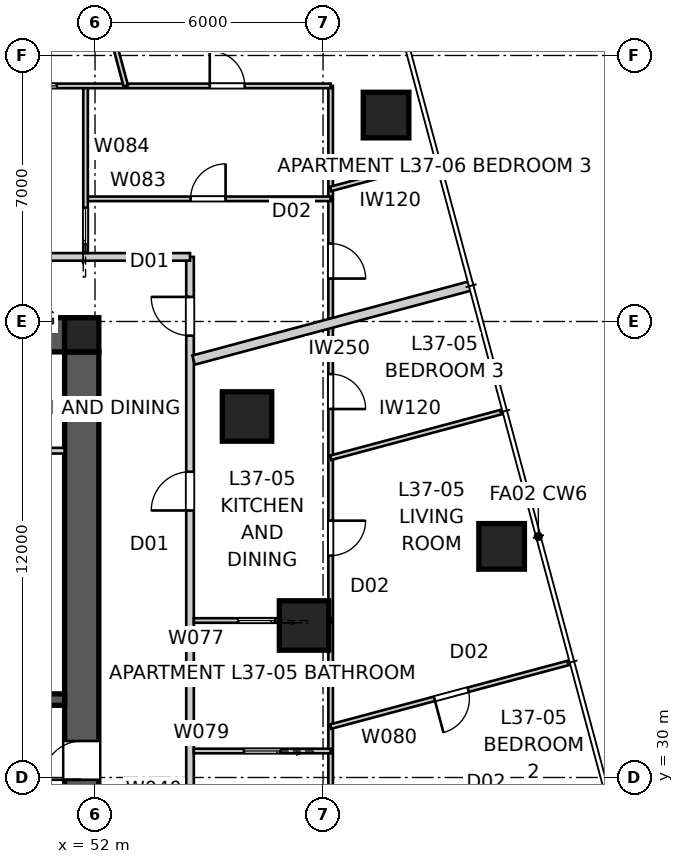
"""IFC4 building model, lengths in metres.
Left out: names, types, materials, properties, quantities, classifications, styles, units other than length and angle.
Written with IfcOpenShell. Run it as: python <this file> out.ifc"""

import sys

from ifc_helpers import new_model, si_unit, direction, frame, frame_2d, origin, origin_2d, place, context, subcontext, project, spatial, polyline, rectangle, outline, extrude, element, fill, save


model = new_model("IFC4")
c1 = context("Model", 3, precision=1e-05, world=origin(), true_north=direction((0.0, 1.0)))
c2 = subcontext(c1, "Body", "Model", "MODEL_VIEW")
j1 = project(units=[si_unit("LENGTHUNIT", "METRE"), si_unit("PLANEANGLEUNIT", "RADIAN")], contexts=[c1])
p1 = place(None, origin())
s1 = spatial("IfcSite", under=j1, at=p1, CompositionType="ELEMENT")
p2 = place(p1, origin())
s2 = spatial("IfcBuilding", under=s1, at=p2, CompositionType="ELEMENT")
p3 = place(p2, frame((0.0, 0.0, 135.4)))
s3 = spatial("IfcBuildingStorey", under=s2, at=p3, CompositionType="ELEMENT", Elevation=135.4)
p4 = place(p3, frame((28.8, 41.65, 0.0), z_axis=(0.0, 0.0, 1.0), x_axis=(1.0, 0.0, 0.0)))
e1 = element("IfcWall", 1, at=p4, inside=s3, PredefinedType="SHEAR", context=c2, shape_type="SweptSolid", body=[
    extrude(outline(polyline([(0.0, -0.45), (22.4, -0.45), (22.4, -0.025), (22.85, -0.025), (22.85, 0.025), (22.4, 0.025), (22.4, 0.45), (0.0, 0.45), (0.0, 0.025), (-0.45, 0.025), (-0.45, -0.025), (0.0, -0.025), (0.0, -0.45)])), origin(), (0.0, 0.0, 1.0), 3.4),
])
p5 = place(p3, frame((51.65, 18.8, 0.0), z_axis=(0.0, 0.0, 1.0), x_axis=(0.0, 1.0, 0.0)))
e2 = element("IfcWall", 2, at=p5, inside=s3, PredefinedType="SHEAR", context=c2, shape_type="SweptSolid", body=[
    extrude(outline(polyline([(0.0, -0.45), (22.4, -0.45), (22.4, -0.025), (22.85, -0.025), (22.85, 0.025), (22.4, 0.025), (22.4, 0.45), (0.0, 0.45), (0.0, 0.025), (-0.45, 0.025), (-0.45, -0.025), (0.0, -0.025), (0.0, -0.45)])), origin(), (0.0, 0.0, 1.0), 3.4),
])
p6 = place(p5, frame((11.14, 0.0, 0.0)))
e3 = element("IfcOpeningElement", 3, at=p6, cuts=e2, PredefinedType="OPENING", context=c2, shape_type="SweptSolid", body=[
    extrude(rectangle(XDim=1.02, YDim=2.4, at=frame_2d((0.51, 1.2))), frame((0.0, 0.46, 0.0), z_axis=(0.0, -1.0, 0.0), x_axis=(1.0, 0.0, 0.0)), (0.0, 0.0, 1.0), 0.92),
])
p7 = place(p3, frame((28.8, 32.05, 0.0), z_axis=(0.0, 0.0, 1.0), x_axis=(1.0, 0.0, 0.0)))
e4 = element("IfcWall", 4, at=p7, inside=s3, PredefinedType="SHEAR", context=c2, shape_type="SweptSolid", body=[
    extrude(rectangle(XDim=22.4, YDim=0.3, at=frame_2d((11.2, 0.0))), origin(), (0.0, 0.0, 1.0), 3.4),
])
p8 = place(p7, frame((19.04, 0.0, 0.0)))
e5 = element("IfcOpeningElement", 5, at=p8, cuts=e4, PredefinedType="OPENING", context=c2, shape_type="SweptSolid", body=[
    extrude(rectangle(XDim=0.92, YDim=2.1, at=frame_2d((0.46, 1.05))), frame((0.0, 0.16, 0.0), z_axis=(0.0, -1.0, 0.0), x_axis=(1.0, 0.0, 0.0)), (0.0, 0.0, 1.0), 0.32),
])
p9 = place(p7, frame((1.265, 0.0, 0.0)))
e6 = element("IfcOpeningElement", 6, at=p9, cuts=e4, PredefinedType="OPENING", context=c2, shape_type="SweptSolid", body=[
    extrude(rectangle(XDim=1.02, YDim=2.1, at=frame_2d((0.51, 1.05))), frame((0.0, 0.16, 0.0), z_axis=(0.0, -1.0, 0.0), x_axis=(1.0, 0.0, 0.0)), (0.0, 0.0, 1.0), 0.32),
])
p10 = place(p7, frame((4.015, 0.0, 0.0)))
e7 = element("IfcOpeningElement", 7, at=p10, cuts=e4, PredefinedType="OPENING", context=c2, shape_type="SweptSolid", body=[
    extrude(rectangle(XDim=0.92, YDim=2.1, at=frame_2d((0.46, 1.05))), frame((0.0, 0.16, 0.0), z_axis=(0.0, -1.0, 0.0), x_axis=(1.0, 0.0, 0.0)), (0.0, 0.0, 1.0), 0.32),
])
p11 = place(p7, frame((6.45, 0.0, 0.0)))
e8 = element("IfcOpeningElement", 8, at=p11, cuts=e4, PredefinedType="OPENING", context=c2, shape_type="SweptSolid", body=[
    extrude(rectangle(XDim=1.1, YDim=2.1, at=frame_2d((0.55, 1.05))), frame((0.0, 0.16, 0.0), z_axis=(0.0, -1.0, 0.0), x_axis=(1.0, 0.0, 0.0)), (0.0, 0.0, 1.0), 0.32),
])
p12 = place(p7, frame((9.25, 0.0, 0.0)))
e9 = element("IfcOpeningElement", 9, at=p12, cuts=e4, PredefinedType="OPENING", context=c2, shape_type="SweptSolid", body=[
    extrude(rectangle(XDim=1.1, YDim=2.1, at=frame_2d((0.55, 1.05))), frame((0.0, 0.16, 0.0), z_axis=(0.0, -1.0, 0.0), x_axis=(1.0, 0.0, 0.0)), (0.0, 0.0, 1.0), 0.32),
])
p13 = place(p7, frame((14.85, 0.0, 0.0)))
e10 = element("IfcOpeningElement", 10, at=p13, cuts=e4, PredefinedType="OPENING", context=c2, shape_type="SweptSolid", body=[
    extrude(rectangle(XDim=1.1, YDim=2.1, at=frame_2d((0.55, 1.05))), frame((0.0, 0.16, 0.0), z_axis=(0.0, -1.0, 0.0), x_axis=(1.0, 0.0, 0.0)), (0.0, 0.0, 1.0), 0.32),
])
p14 = place(p3, frame((51.65, 41.65, 0.0), z_axis=(0.0, 0.0, 1.0), x_axis=(1.0, 0.0, 0.0)))
e11 = element("IfcColumn", 11, at=p14, inside=s3, PredefinedType="COLUMN", context=c2, shape_type="SweptSolid", body=[
    extrude(rectangle(XDim=0.9, YDim=0.9, at=origin_2d()), origin(), (0.0, 0.0, 1.0), 3.4),
])
for number, where, z_axis, x_axis in (
    (12, (62.699, 36.082, 0.0), (0.0, 0.0, 1.0), (1.0, 0.0, 0.0)),
    (13, (59.658, 47.432, 0.0), (0.0, 0.0, 1.0), (1.0, 0.0, 0.0)),
):
    element("IfcColumn", number, at=place(p3, frame(where, z_axis=z_axis, x_axis=x_axis)), inside=s3, PredefinedType="COLUMN", context=c2, shape_type="SweptSolid", body=[
        extrude(rectangle(XDim=1.2, YDim=1.2, at=origin_2d()), origin(), (0.0, 0.0, 1.0), 3.2),
    ])
for number, where, z_axis, x_axis in (
    (14, (57.5, 34.0, 0.0), (0.0, 0.0, 1.0), (1.0, 0.0, 0.0)),
    (15, (56.0, 39.5, 0.0), (0.0, 0.0, 1.0), (1.0, 0.0, 0.0)),
):
    element("IfcColumn", number, at=place(p3, frame(where, z_axis=z_axis, x_axis=x_axis)), inside=s3, PredefinedType="COLUMN", context=c2, shape_type="SweptSolid", body=[
        extrude(rectangle(XDim=1.3, YDim=1.3, at=origin_2d()), origin(), (0.0, 0.0, 1.0), 3.4),
    ])
p15 = place(p3, frame((54.5, 15.5, 0.0), z_axis=(0.0, 0.0, 1.0), x_axis=(0.0, 1.0, 0.0)))
e16 = element("IfcWall", 16, at=p15, inside=s3, PredefinedType="PARTITIONING", context=c2, shape_type="SweptSolid", body=[
    extrude(rectangle(XDim=28.2, YDim=0.2, at=frame_2d((14.1, 0.0))), origin(), (0.0, 0.0, 1.0), 3.2),
])
p16 = place(p15, frame((21.527, 0.0, 0.0)))
e17 = element("IfcOpeningElement", 17, at=p16, cuts=e16, PredefinedType="OPENING", context=c2, shape_type="SweptSolid", body=[
    extrude(rectangle(XDim=1.02, YDim=2.34, at=frame_2d((0.51, 1.17))), frame((0.0, 0.11, 0.0), z_axis=(0.0, -1.0, 0.0), x_axis=(1.0, 0.0, 0.0)), (0.0, 0.0, 1.0), 0.22),
])
p17 = place(p15, frame((5.806, 0.0, 0.0)))
e18 = element("IfcOpeningElement", 18, at=p17, cuts=e16, PredefinedType="OPENING", context=c2, shape_type="SweptSolid", body=[
    extrude(rectangle(XDim=1.02, YDim=2.34, at=frame_2d((0.51, 1.17))), frame((0.0, 0.11, 0.0), z_axis=(0.0, -1.0, 0.0), x_axis=(1.0, 0.0, 0.0)), (0.0, 0.0, 1.0), 0.22),
])
p18 = place(p15, frame((26.127, 0.0, 0.0)))
e19 = element("IfcOpeningElement", 19, at=p18, cuts=e16, PredefinedType="OPENING", context=c2, shape_type="SweptSolid", body=[
    extrude(rectangle(XDim=1.02, YDim=2.34, at=frame_2d((0.51, 1.17))), frame((0.0, 0.11, 0.0), z_axis=(0.0, -1.0, 0.0), x_axis=(1.0, 0.0, 0.0)), (0.0, 0.0, 1.0), 0.22),
])
p19 = place(p3, frame((54.5, 43.7, 0.0), z_axis=(0.0, 0.0, 1.0), x_axis=(-1.0, 0.0, 0.0)))
e20 = element("IfcWall", 20, at=p19, inside=s3, PredefinedType="PARTITIONING", context=c2, shape_type="SweptSolid", body=[
    extrude(rectangle(XDim=29.0, YDim=0.2, at=frame_2d((14.5, 0.0))), origin(), (0.0, 0.0, 1.0), 3.2),
])
p20 = place(p19, frame((12.852, 0.0, 0.0)))
e21 = element("IfcOpeningElement", 21, at=p20, cuts=e20, PredefinedType="OPENING", context=c2, shape_type="SweptSolid", body=[
    extrude(rectangle(XDim=1.02, YDim=2.34, at=frame_2d((0.51, 1.17))), frame((0.0, 0.11, 0.0), z_axis=(0.0, -1.0, 0.0), x_axis=(1.0, 0.0, 0.0)), (0.0, 0.0, 1.0), 0.22),
])
p21 = place(p19, frame((5.529, 0.0, 0.0)))
e22 = element("IfcOpeningElement", 22, at=p21, cuts=e20, PredefinedType="OPENING", context=c2, shape_type="SweptSolid", body=[
    extrude(rectangle(XDim=1.02, YDim=2.34, at=frame_2d((0.51, 1.17))), frame((0.0, 0.11, 0.0), z_axis=(0.0, -1.0, 0.0), x_axis=(1.0, 0.0, 0.0)), (0.0, 0.0, 1.0), 0.22),
])
p22 = place(p3, frame((61.896, 42.942, 0.0), z_axis=(0.0, 0.0, 1.0), x_axis=(-0.965924988656, -0.258822171171, 0.0)))
e23 = element("IfcWall", 23, at=p22, inside=s3, PredefinedType="PARTITIONING", context=c2, shape_type="SweptSolid", body=[
    extrude(rectangle(XDim=7.56, YDim=0.25, at=frame_2d((3.78, 0.0))), origin(), (0.0, 0.0, 1.0), 3.2),
])
p23 = place(p3, frame((43.0, 38.6, 0.0), z_axis=(0.0, 0.0, 1.0), x_axis=(1.0, 0.0, 0.0)))
e24 = element("IfcWall", 24, at=p23, inside=s3, PredefinedType="SOLIDWALL", context=c2, shape_type="SweptSolid", body=[
    extrude(rectangle(XDim=8.2, YDim=0.15, at=frame_2d((4.1, 0.0))), origin(), (0.0, 0.0, 1.0), 3.2),
])
p24 = place(p23, frame((3.64, 0.0, 0.0)))
e25 = element("IfcOpeningElement", 25, at=p24, cuts=e24, PredefinedType="OPENING", context=c2, shape_type="SweptSolid", body=[
    extrude(rectangle(XDim=0.92, YDim=2.1, at=frame_2d((0.46, 1.05))), frame((0.0, 0.085, 0.0), z_axis=(0.0, -1.0, 0.0), x_axis=(1.0, 0.0, 0.0)), (0.0, 0.0, 1.0), 0.17),
])
p25 = place(p3, frame((58.2, 48.2, 0.0), z_axis=(0.0, 0.0, 1.0), x_axis=(0.0, -1.0, 0.0)))
e26 = element("IfcWall", 26, at=p25, inside=s3, PredefinedType="PARTITIONING", context=c2, shape_type="SweptSolid", body=[
    extrude(rectangle(XDim=33.512, YDim=0.12, at=frame_2d((16.756, 0.0))), origin(), (0.0, 0.0, 1.0), 2.399),
])
p26 = place(p25, frame((11.441, 0.0, 0.0)))
e27 = element("IfcOpeningElement", 27, at=p26, cuts=e26, PredefinedType="OPENING", context=c2, shape_type="SweptSolid", body=[
    extrude(rectangle(XDim=0.92, YDim=2.34, at=frame_2d((0.46, 1.17))), frame((0.0, 0.07, 0.0), z_axis=(0.0, -1.0, 0.0), x_axis=(1.0, 0.0, 0.0)), (0.0, 0.0, 1.0), 0.14),
])
p27 = place(p25, frame((7.583, 0.0, 0.0)))
e28 = element("IfcOpeningElement", 28, at=p27, cuts=e26, PredefinedType="OPENING", context=c2, shape_type="SweptSolid", body=[
    extrude(rectangle(XDim=0.92, YDim=2.34, at=frame_2d((0.46, 1.17))), frame((0.0, 0.07, 0.0), z_axis=(0.0, -1.0, 0.0), x_axis=(1.0, 0.0, 0.0)), (0.0, 0.0, 1.0), 0.14),
])
p28 = place(p25, frame((25.269, 0.0, 0.0)))
e29 = element("IfcOpeningElement", 29, at=p28, cuts=e26, PredefinedType="OPENING", context=c2, shape_type="SweptSolid", body=[
    extrude(rectangle(XDim=0.92, YDim=2.34, at=frame_2d((0.46, 1.17))), frame((0.0, 0.07, 0.0), z_axis=(0.0, -1.0, 0.0), x_axis=(1.0, 0.0, 0.0)), (0.0, 0.0, 1.0), 0.14),
])
p29 = place(p25, frame((28.662, 0.0, 0.0)))
e30 = element("IfcOpeningElement", 30, at=p29, cuts=e26, PredefinedType="OPENING", context=c2, shape_type="SweptSolid", body=[
    extrude(rectangle(XDim=0.92, YDim=2.34, at=frame_2d((0.46, 1.17))), frame((0.0, 0.07, 0.0), z_axis=(0.0, -1.0, 0.0), x_axis=(1.0, 0.0, 0.0)), (0.0, 0.0, 1.0), 0.14),
])
p30 = place(p25, frame((4.15, 0.0, 0.0)))
e31 = element("IfcOpeningElement", 31, at=p30, cuts=e26, PredefinedType="OPENING", context=c2, shape_type="SweptSolid", body=[
    extrude(rectangle(XDim=0.92, YDim=2.34, at=frame_2d((0.46, 1.17))), frame((0.0, 0.07, 0.0), z_axis=(0.0, -1.0, 0.0), x_axis=(1.0, 0.0, 0.0)), (0.0, 0.0, 1.0), 0.14),
])
p31 = place(p3, frame((58.2, 34.131, 0.0), z_axis=(0.0, 0.0, 1.0), x_axis=(-1.0, 0.0, 0.0)))
e32 = element("IfcWall", 32, at=p31, inside=s3, PredefinedType="PARTITIONING", context=c2, shape_type="SweptSolid", body=[
    extrude(rectangle(XDim=3.6, YDim=0.12, at=frame_2d((1.8, 0.0))), origin(), (0.0, 0.0, 1.0), 3.2),
])
p32 = place(p31, frame((1.47, 0.0, 0.0)))
e33 = element("IfcOpeningElement", 33, at=p32, cuts=e32, PredefinedType="OPENING", context=c2, shape_type="SweptSolid", body=[
    extrude(rectangle(XDim=0.96, YDim=2.1, at=frame_2d((0.48, 1.05))), frame((0.0, 0.07, 0.0), z_axis=(0.0, -1.0, 0.0), x_axis=(1.0, 0.0, 0.0)), (0.0, 0.0, 1.0), 0.14),
])
p33 = place(p3, frame((58.2, 30.698, 0.0), z_axis=(0.0, 0.0, 1.0), x_axis=(-1.0, 0.0, 0.0)))
e34 = element("IfcWall", 34, at=p33, inside=s3, PredefinedType="PARTITIONING", context=c2, shape_type="SweptSolid", body=[
    extrude(rectangle(XDim=3.6, YDim=0.12, at=frame_2d((1.8, 0.0))), origin(), (0.0, 0.0, 1.0), 3.2),
])
p34 = place(p33, frame((1.32, 0.0, 0.0)))
e35 = element("IfcOpeningElement", 35, at=p34, cuts=e34, PredefinedType="OPENING", context=c2, shape_type="SweptSolid", body=[
    extrude(rectangle(XDim=0.96, YDim=2.1, at=frame_2d((0.48, 1.05))), frame((0.0, 0.07, 0.0), z_axis=(0.0, -1.0, 0.0), x_axis=(1.0, 0.0, 0.0)), (0.0, 0.0, 1.0), 0.14),
])
p35 = place(p3, frame((64.511, 33.031, 0.0), z_axis=(0.0, 0.0, 1.0), x_axis=(-0.96591852682, -0.258846285554, 0.0)))
e36 = element("IfcWall", 36, at=p35, inside=s3, PredefinedType="PARTITIONING", context=c2, shape_type="SweptSolid", body=[
    extrude(rectangle(XDim=6.533, YDim=0.12, at=frame_2d((3.267, 0.0))), origin(), (0.0, 0.0, 1.0), 3.2),
])
p36 = place(p35, frame((2.787, 0.0, 0.0)))
e37 = element("IfcOpeningElement", 37, at=p36, cuts=e36, PredefinedType="OPENING", context=c2, shape_type="SweptSolid", body=[
    extrude(rectangle(XDim=0.92, YDim=2.34, at=frame_2d((0.46, 1.17))), frame((0.0, 0.07, 0.0), z_axis=(0.0, -1.0, 0.0), x_axis=(1.0, 0.0, 0.0)), (0.0, 0.0, 1.0), 0.14),
])
p37 = place(p3, frame((58.2, 38.414, 0.0), z_axis=(0.0, 0.0, 1.0), x_axis=(0.965928353663, 0.258809612631, 0.0)))
e38 = element("IfcWall", 38, at=p37, inside=s3, PredefinedType="PARTITIONING", context=c2, shape_type="SweptSolid", body=[
    extrude(rectangle(XDim=4.702, YDim=0.12, at=frame_2d((2.351, 0.0))), origin(), (0.0, 0.0, 1.0), 3.2),
])
p38 = place(p3, frame((51.751, 45.228, 0.0), z_axis=(0.0, 0.0, 1.0), x_axis=(1.0, 0.0, 0.0)))
e39 = element("IfcWall", 39, at=p38, inside=s3, PredefinedType="PARTITIONING", context=c2, shape_type="SweptSolid", body=[
    extrude(rectangle(XDim=6.449, YDim=0.12, at=frame_2d((3.225, 0.0))), origin(), (0.0, 0.0, 1.0), 3.2),
])
p39 = place(p38, frame((2.764, 0.0, 0.0)))
e40 = element("IfcOpeningElement", 40, at=p39, cuts=e39, PredefinedType="OPENING", context=c2, shape_type="SweptSolid", body=[
    extrude(rectangle(XDim=0.92, YDim=2.34, at=frame_2d((0.46, 1.17))), frame((0.0, 0.07, 0.0), z_axis=(0.0, -1.0, 0.0), x_axis=(1.0, 0.0, 0.0)), (0.0, 0.0, 1.0), 0.14),
])
p40 = place(p3, frame((51.751, 43.8, 0.0), z_axis=(0.0, 0.0, 1.0), x_axis=(0.0, 1.0, 0.0)))
e41 = element("IfcWall", 41, at=p40, inside=s3, PredefinedType="PARTITIONING", context=c2, shape_type="SweptSolid", body=[
    extrude(rectangle(XDim=4.4, YDim=0.12, at=frame_2d((2.2, 0.0))), origin(), (0.0, 0.0, 1.0), 3.2),
])
p41 = place(p40, frame((0.234, 0.0, 0.0)))
e42 = element("IfcOpeningElement", 42, at=p41, cuts=e41, PredefinedType="OPENING", context=c2, shape_type="SweptSolid", body=[
    extrude(rectangle(XDim=0.96, YDim=2.0, at=frame_2d((0.48, 1.0))), frame((0.0, 0.07, 0.0), z_axis=(0.0, -1.0, 0.0), x_axis=(1.0, 0.0, 0.0)), (0.0, 0.0, 1.0), 0.14),
])
p42 = place(p3, frame((26.657, 48.2, 0.0), z_axis=(0.0, 0.0, 1.0), x_axis=(1.0, 0.0, 0.0)))
e43 = element("IfcWall", 43, at=p42, inside=s3, PredefinedType="PARTITIONING", context=c2, shape_type="SweptSolid", body=[
    extrude(rectangle(XDim=31.543, YDim=0.12, at=frame_2d((15.771, 0.0))), origin(), (0.0, 0.0, 1.0), 2.399),
])
p43 = place(p42, frame((13.4, 0.0, 0.0)))
e44 = element("IfcOpeningElement", 44, at=p43, cuts=e43, PredefinedType="OPENING", context=c2, shape_type="SweptSolid", body=[
    extrude(rectangle(XDim=0.92, YDim=2.34, at=frame_2d((0.46, 1.17))), frame((0.0, 0.07, 0.0), z_axis=(0.0, -1.0, 0.0), x_axis=(1.0, 0.0, 0.0)), (0.0, 0.0, 1.0), 0.14),
])
p44 = place(p42, frame((20.723, 0.0, 0.0)))
e45 = element("IfcOpeningElement", 45, at=p44, cuts=e43, PredefinedType="OPENING", context=c2, shape_type="SweptSolid", body=[
    extrude(rectangle(XDim=0.92, YDim=2.34, at=frame_2d((0.46, 1.17))), frame((0.0, 0.07, 0.0), z_axis=(0.0, -1.0, 0.0), x_axis=(1.0, 0.0, 0.0)), (0.0, 0.0, 1.0), 0.14),
])
p45 = place(p42, frame((10.117, 0.0, 0.0)))
e46 = element("IfcOpeningElement", 46, at=p45, cuts=e43, PredefinedType="OPENING", context=c2, shape_type="SweptSolid", body=[
    extrude(rectangle(XDim=0.96, YDim=2.1, at=frame_2d((0.48, 1.05))), frame((0.0, 0.07, 0.0), z_axis=(0.0, -1.0, 0.0), x_axis=(1.0, 0.0, 0.0)), (0.0, 0.0, 1.0), 0.14),
])
p46 = place(p42, frame((28.362, 0.0, 0.0)))
e47 = element("IfcOpeningElement", 47, at=p46, cuts=e43, PredefinedType="OPENING", context=c2, shape_type="SweptSolid", body=[
    extrude(rectangle(XDim=0.92, YDim=2.34, at=frame_2d((0.46, 1.17))), frame((0.0, 0.07, 0.0), z_axis=(0.0, -1.0, 0.0), x_axis=(1.0, 0.0, 0.0)), (0.0, 0.0, 1.0), 0.14),
])
p47 = place(p42, frame((23.375, 0.0, 0.0)))
e48 = element("IfcOpeningElement", 48, at=p47, cuts=e43, PredefinedType="OPENING", context=c2, shape_type="SweptSolid", body=[
    extrude(rectangle(XDim=0.96, YDim=2.1, at=frame_2d((0.48, 1.05))), frame((0.0, 0.07, 0.0), z_axis=(0.0, -1.0, 0.0), x_axis=(1.0, 0.0, 0.0)), (0.0, 0.0, 1.0), 0.14),
])
p48 = place(p3, frame((52.809, 48.2, 0.0), z_axis=(0.0, 0.0, 1.0), x_axis=(-0.258829444594, 0.965923039694, 0.0)))
e49 = element("IfcWall", 49, at=p48, inside=s3, PredefinedType="PARTITIONING", context=c2, shape_type="SweptSolid", body=[
    extrude(rectangle(XDim=10.196, YDim=0.12, at=frame_2d((5.098, 0.0))), origin(), (0.0, 0.0, 1.0), 3.2),
])
p49 = place(p3, frame((60.974, 46.231, 0.0), z_axis=(0.0, 0.0, 1.0), x_axis=(-0.965929456086, -0.258805498136, 0.0)))
e50 = element("IfcWall", 50, at=p49, inside=s3, PredefinedType="PARTITIONING", context=c2, shape_type="SweptSolid", body=[
    extrude(rectangle(XDim=2.872, YDim=0.12, at=frame_2d((1.436, 0.0))), origin(), (0.0, 0.0, 1.0), 3.2),
])
p50 = place(p16, origin())
e51 = element("IfcDoor", 51, at=p50, inside=s3, OperationType="SINGLE_SWING_LEFT", PredefinedType="DOOR", context=c2, shape_type="SweptSolid", body=[
    extrude(rectangle(XDim=1.02, YDim=2.34, at=frame_2d((0.51, 1.17))), frame((0.0, 0.025, 0.0), z_axis=(0.0, -1.0, 0.0), x_axis=(1.0, 0.0, 0.0)), (0.0, 0.0, 1.0), 0.05),
])
fill(e17, e51)
p51 = place(p18, origin())
e52 = element("IfcDoor", 52, at=p51, inside=s3, OperationType="SINGLE_SWING_RIGHT", PredefinedType="DOOR", context=c2, shape_type="SweptSolid", body=[
    extrude(rectangle(XDim=1.02, YDim=2.34, at=frame_2d((0.51, 1.17))), frame((0.0, 0.025, 0.0), z_axis=(0.0, -1.0, 0.0), x_axis=(1.0, 0.0, 0.0)), (0.0, 0.0, 1.0), 0.05),
])
fill(e19, e52)
p52 = place(p26, origin())
e53 = element("IfcDoor", 53, at=p52, inside=s3, OperationType="SINGLE_SWING_LEFT", PredefinedType="DOOR", context=c2, shape_type="SweptSolid", body=[
    extrude(rectangle(XDim=0.92, YDim=2.34, at=frame_2d((0.46, 1.17))), frame((0.0, 0.025, 0.0), z_axis=(0.0, -1.0, 0.0), x_axis=(1.0, 0.0, 0.0)), (0.0, 0.0, 1.0), 0.05),
])
fill(e27, e53)
p53 = place(p32, origin())
e54 = element("IfcDoor", 54, at=p53, inside=s3, OperationType="SLIDING_TO_LEFT", PredefinedType="DOOR", context=c2, shape_type="SweptSolid", body=[
    extrude(rectangle(XDim=0.96, YDim=2.1, at=frame_2d((0.48, 1.05))), frame((0.0, 0.025, 0.0), z_axis=(0.0, -1.0, 0.0), x_axis=(1.0, 0.0, 0.0)), (0.0, 0.0, 1.0), 0.05),
])
fill(e33, e54)
p54 = place(p27, origin())
e55 = element("IfcDoor", 55, at=p54, inside=s3, OperationType="SINGLE_SWING_RIGHT", PredefinedType="DOOR", context=c2, shape_type="SweptSolid", body=[
    extrude(rectangle(XDim=0.92, YDim=2.34, at=frame_2d((0.46, 1.17))), frame((0.0, 0.025, 0.0), z_axis=(0.0, -1.0, 0.0), x_axis=(1.0, 0.0, 0.0)), (0.0, 0.0, 1.0), 0.05),
])
fill(e28, e55)
p55 = place(p39, origin())
e56 = element("IfcDoor", 56, at=p55, inside=s3, OperationType="SINGLE_SWING_RIGHT", PredefinedType="DOOR", context=c2, shape_type="SweptSolid", body=[
    extrude(rectangle(XDim=0.92, YDim=2.34, at=frame_2d((0.46, 1.17))), frame((0.0, 0.025, 0.0), z_axis=(0.0, -1.0, 0.0), x_axis=(1.0, 0.0, 0.0)), (0.0, 0.0, 1.0), 0.05),
])
fill(e40, e56)
p56 = place(p30, origin())
e57 = element("IfcDoor", 57, at=p56, inside=s3, OperationType="SINGLE_SWING_RIGHT", PredefinedType="DOOR", context=c2, shape_type="SweptSolid", body=[
    extrude(rectangle(XDim=0.92, YDim=2.34, at=frame_2d((0.46, 1.17))), frame((0.0, 0.025, 0.0), z_axis=(0.0, -1.0, 0.0), x_axis=(1.0, 0.0, 0.0)), (0.0, 0.0, 1.0), 0.05),
])
fill(e31, e57)
p57 = place(p41, origin())
e58 = element("IfcDoor", 58, at=p57, inside=s3, OperationType="SLIDING_TO_LEFT", PredefinedType="DOOR", context=c2, shape_type="SweptSolid", body=[
    extrude(rectangle(XDim=0.96, YDim=2.0, at=frame_2d((0.48, 1.0))), frame((0.0, 0.025, 0.0), z_axis=(0.0, -1.0, 0.0), x_axis=(1.0, 0.0, 0.0)), (0.0, 0.0, 1.0), 0.05),
])
fill(e42, e58)
p58 = place(p36, origin())
e59 = element("IfcDoor", 59, at=p58, inside=s3, OperationType="SINGLE_SWING_RIGHT", PredefinedType="DOOR", context=c2, shape_type="SweptSolid", body=[
    extrude(rectangle(XDim=0.92, YDim=2.34, at=frame_2d((0.46, 1.17))), frame((0.0, 0.025, 0.0), z_axis=(0.0, -1.0, 0.0), x_axis=(1.0, 0.0, 0.0)), (0.0, 0.0, 1.0), 0.05),
])
fill(e37, e59)
p59 = place(p34, origin())
e60 = element("IfcDoor", 60, at=p59, inside=s3, OperationType="SLIDING_TO_LEFT", PredefinedType="DOOR", context=c2, shape_type="SweptSolid", body=[
    extrude(rectangle(XDim=0.96, YDim=2.1, at=frame_2d((0.48, 1.05))), frame((0.0, 0.025, 0.0), z_axis=(0.0, -1.0, 0.0), x_axis=(1.0, 0.0, 0.0)), (0.0, 0.0, 1.0), 0.05),
])
fill(e35, e60)
p60 = place(p46, origin())
e61 = element("IfcDoor", 61, at=p60, inside=s3, OperationType="SINGLE_SWING_LEFT", PredefinedType="DOOR", context=c2, shape_type="SweptSolid", body=[
    extrude(rectangle(XDim=0.92, YDim=2.34, at=frame_2d((0.46, 1.17))), frame((0.0, 0.025, 0.0), z_axis=(0.0, -1.0, 0.0), x_axis=(1.0, 0.0, 0.0)), (0.0, 0.0, 1.0), 0.05),
])
fill(e47, e61)
p61 = place(p47, origin())
e62 = element("IfcDoor", 62, at=p61, inside=s3, OperationType="SLIDING_TO_LEFT", PredefinedType="DOOR", context=c2, shape_type="SweptSolid", body=[
    extrude(rectangle(XDim=0.96, YDim=2.1, at=frame_2d((0.48, 1.05))), frame((0.0, 0.025, 0.0), z_axis=(0.0, -1.0, 0.0), x_axis=(1.0, 0.0, 0.0)), (0.0, 0.0, 1.0), 0.05),
])
fill(e48, e62)
p62 = place(p6, origin())
e63 = element("IfcDoor", 63, at=p62, inside=s3, OperationType="SINGLE_SWING_LEFT", PredefinedType="DOOR", context=c2, shape_type="SweptSolid", body=[
    extrude(rectangle(XDim=1.02, YDim=2.4, at=frame_2d((0.51, 1.2))), frame((0.0, 0.025, 0.0), z_axis=(0.0, -1.0, 0.0), x_axis=(1.0, 0.0, 0.0)), (0.0, 0.0, 1.0), 0.05),
])
fill(e3, e63)
save(model, sys.argv[1])
